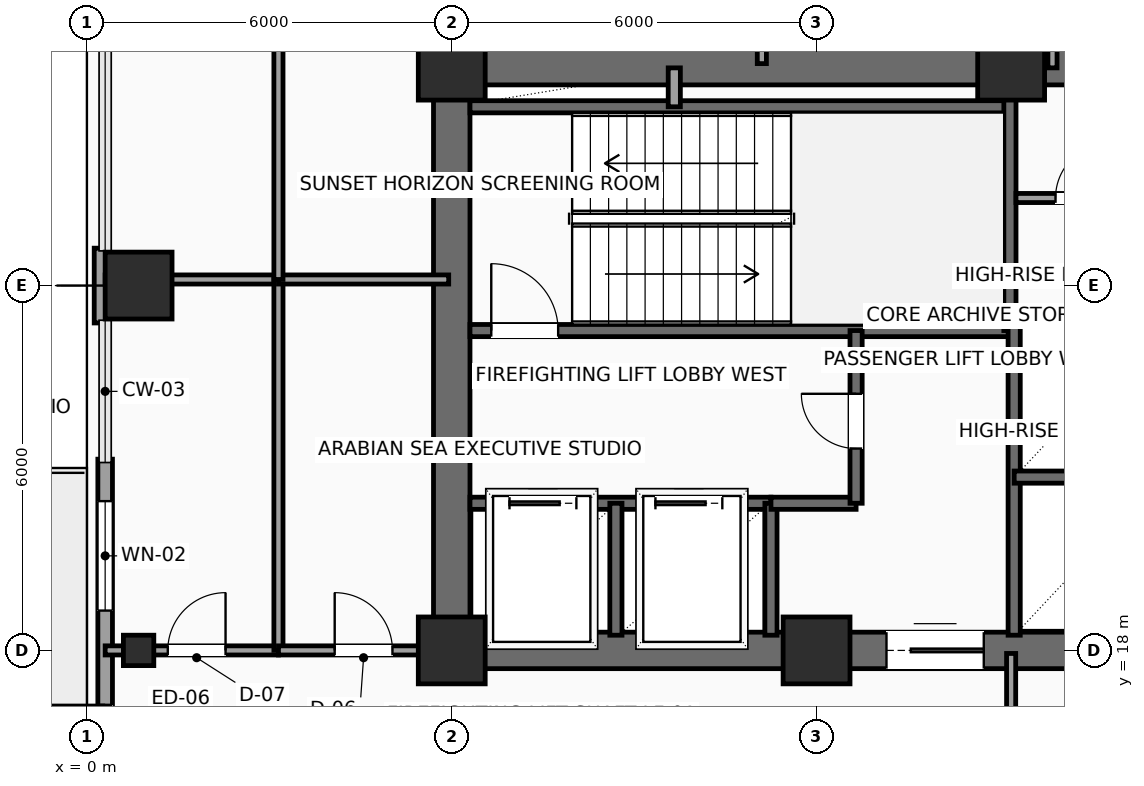
"""IFC4 building model, lengths in metres.
Left out: names, types, materials, properties, quantities, classifications, styles, units other than length and angle.
Written with IfcOpenShell. Run it as: python <this file> out.ifc"""

import sys

from ifc_helpers import new_model, si_unit, direction, frame, frame_2d, origin, origin_2d, place, context, subcontext, project, spatial, rectangle, hollow_rectangle, extrude, element, fill, save


model = new_model("IFC4")
c1 = context("Model", 3, precision=1e-05, world=origin(), true_north=direction((0.0, 1.0)))
c2 = subcontext(c1, "Body", "Model", "MODEL_VIEW")
j1 = project(units=[si_unit("LENGTHUNIT", "METRE"), si_unit("PLANEANGLEUNIT", "RADIAN")], contexts=[c1])
p1 = place(None, origin())
s1 = spatial("IfcSite", under=j1, at=p1, CompositionType="ELEMENT")
p2 = place(p1, origin())
s2 = spatial("IfcBuilding", under=s1, at=p2, CompositionType="ELEMENT")
p3 = place(p2, frame((0.0, 0.0, 160.65)))
s3 = spatial("IfcBuildingStorey", under=s2, at=p3, CompositionType="ELEMENT", Elevation=160.65)
for number, where, z_axis, x_axis in (
    (1, (6.0, 18.0, 0.0), (0.0, 0.0, 1.0), (1.0, 0.0, 0.0)),
    (2, (12.0, 18.0, 0.0), (0.0, 0.0, 1.0), (1.0, 0.0, 0.0)),
    (3, (6.0, 27.6, 0.0), (0.0, 0.0, 1.0), (1.0, 0.0, 0.0)),
    (4, (15.2, 27.6, 0.0), (0.0, 0.0, 1.0), (1.0, 0.0, 0.0)),
):
    element("IfcColumn", number, at=place(p3, frame(where, z_axis=z_axis, x_axis=x_axis)), inside=s3, PredefinedType="COLUMN", context=c2, shape_type="SweptSolid", body=[
        extrude(rectangle(XDim=1.1, YDim=1.1, at=origin_2d()), origin(), (0.0, 0.0, 1.0), 3.75),
    ])
p4 = place(p3, frame((0.85, 18.0, 0.0), z_axis=(0.0, 0.0, 1.0), x_axis=(1.0, 0.0, 0.0)))
e5 = element("IfcColumn", 5, at=p4, inside=s3, PredefinedType="COLUMN", context=c2, shape_type="SweptSolid", body=[
    extrude(hollow_rectangle(XDim=0.5, YDim=0.5, WallThickness=0.025, InnerFilletRadius=0.025, OuterFilletRadius=0.04, at=origin_2d()), origin(), (0.0, 0.0, 1.0), 3.75),
])
p5 = place(p3, frame((0.85, 24.0, 0.0), z_axis=(0.0, 0.0, 1.0), x_axis=(1.0, 0.0, 0.0)))
e6 = element("IfcColumn", 6, at=p5, inside=s3, PredefinedType="COLUMN", context=c2, shape_type="SweptSolid", body=[
    extrude(rectangle(XDim=1.1, YDim=1.1, at=origin_2d()), origin(), (0.0, 0.0, 1.0), 3.75),
])
p6 = place(p3, frame((0.3, 11.855, 0.0), z_axis=(0.0, 0.0, 1.0), x_axis=(0.0, 1.0, 0.0)))
e7 = element("IfcWall", 7, at=p6, inside=s3, PredefinedType="SOLIDWALL", context=c2, shape_type="SweptSolid", body=[
    extrude(rectangle(XDim=9.29, YDim=0.24, at=frame_2d((4.645, 0.0))), origin(), (0.0, 0.0, 1.0), 3.425),
])
p7 = place(p6, frame((4.2, 0.0, 0.0)))
e8 = element("IfcOpeningElement", 8, at=p7, cuts=e7, PredefinedType="OPENING", context=c2, shape_type="SweptSolid", body=[
    extrude(rectangle(XDim=1.05, YDim=2.2, at=frame_2d((0.525, 1.1))), frame((0.0, 0.13, 0.0), z_axis=(0.0, -1.0, 0.0), x_axis=(1.0, 0.0, 0.0)), (0.0, 0.0, 1.0), 0.26),
])
p8 = place(p6, frame((6.8, 0.0, 0.85)))
e9 = element("IfcOpeningElement", 9, at=p8, cuts=e7, PredefinedType="OPENING", context=c2, shape_type="SweptSolid", body=[
    extrude(rectangle(XDim=1.8, YDim=2.1, at=frame_2d((0.9, 1.05))), frame((0.0, 0.13, 0.0), z_axis=(0.0, -1.0, 0.0), x_axis=(1.0, 0.0, 0.0)), (0.0, 0.0, 1.0), 0.26),
])
p9 = place(p3, frame((0.24, 23.385, 0.0), z_axis=(0.0, 0.0, 1.0), x_axis=(0.0, 1.0, 0.0)))
e10 = element("IfcWall", 10, at=p9, inside=s3, PredefinedType="SOLIDWALL", context=c2, shape_type="SweptSolid", body=[
    extrude(rectangle(XDim=1.23, YDim=0.24, at=frame_2d((0.615, 0.0))), origin(), (0.0, 0.0, 1.0), 3.425),
])
p10 = place(p3, frame((6.0, 18.0, 0.0), z_axis=(0.0, 0.0, 1.0), x_axis=(1.0, 0.0, 0.0)))
e11 = element("IfcWall", 11, at=p10, inside=s3, PredefinedType="SHEAR", context=c2, shape_type="SweptSolid", body=[
    extrude(rectangle(XDim=12.0, YDim=0.6, at=frame_2d((6.0, 0.0))), origin(), (0.0, 0.0, 1.0), 3.425),
])
p11 = place(p10, frame((7.15, 0.0, 0.0)))
e12 = element("IfcOpeningElement", 12, at=p11, cuts=e11, PredefinedType="OPENING", context=c2, shape_type="SweptSolid", body=[
    extrude(rectangle(XDim=1.6, YDim=2.3, at=frame_2d((0.8, 1.15))), frame((0.0, 0.31, 0.0), z_axis=(0.0, -1.0, 0.0), x_axis=(1.0, 0.0, 0.0)), (0.0, 0.0, 1.0), 0.62),
])
p12 = place(p3, frame((6.0, 27.6, 0.0), z_axis=(0.0, 0.0, 1.0), x_axis=(1.0, 0.0, 0.0)))
e13 = element("IfcWall", 13, at=p12, inside=s3, PredefinedType="SHEAR", context=c2, shape_type="SweptSolid", body=[
    extrude(rectangle(XDim=12.0, YDim=0.6, at=frame_2d((6.0, 0.0))), origin(), (0.0, 0.0, 1.0), 3.425),
])
p13 = place(p12, frame((10.2, 0.0, 0.0)))
e14 = element("IfcOpeningElement", 14, at=p13, cuts=e13, PredefinedType="OPENING", context=c2, shape_type="SweptSolid", body=[
    extrude(rectangle(XDim=0.9, YDim=2.15, at=frame_2d((0.45, 1.075))), frame((0.0, 0.31, 0.0), z_axis=(0.0, -1.0, 0.0), x_axis=(1.0, 0.0, 0.0)), (0.0, 0.0, 1.0), 0.62),
])
p14 = place(p3, frame((6.0, 18.0, 0.0), z_axis=(0.0, 0.0, 1.0), x_axis=(0.0, 1.0, 0.0)))
e15 = element("IfcWall", 15, at=p14, inside=s3, PredefinedType="SHEAR", context=c2, shape_type="SweptSolid", body=[
    extrude(rectangle(XDim=9.6, YDim=0.6, at=frame_2d((4.8, 0.0))), origin(), (0.0, 0.0, 1.0), 3.425),
])
p15 = place(p3, frame((6.3, 23.26, 0.0), z_axis=(0.0, 0.0, 1.0), x_axis=(1.0, 0.0, 0.0)))
e16 = element("IfcWall", 16, at=p15, inside=s3, PredefinedType="SHEAR", context=c2, shape_type="SweptSolid", body=[
    extrude(rectangle(XDim=8.88, YDim=0.2, at=frame_2d((4.44, 0.0))), origin(), (0.0, 0.0, 1.0), 3.425),
])
p16 = place(p15, frame((0.35, 0.0, 0.0)))
e17 = element("IfcOpeningElement", 17, at=p16, cuts=e16, PredefinedType="OPENING", context=c2, shape_type="SweptSolid", body=[
    extrude(rectangle(XDim=1.1, YDim=2.2, at=frame_2d((0.55, 1.1))), frame((0.0, 0.11, 0.0), z_axis=(0.0, -1.0, 0.0), x_axis=(1.0, 0.0, 0.0)), (0.0, 0.0, 1.0), 0.22),
])
p17 = place(p3, frame((6.3, 26.94, 0.0), z_axis=(0.0, 0.0, 1.0), x_axis=(1.0, 0.0, 0.0)))
e18 = element("IfcWall", 18, at=p17, inside=s3, PredefinedType="SHEAR", context=c2, shape_type="SweptSolid", body=[
    extrude(rectangle(XDim=8.88, YDim=0.2, at=frame_2d((4.44, 0.0))), origin(), (0.0, 0.0, 1.0), 3.425),
])
p18 = place(p3, frame((15.18, 23.26, 0.0), z_axis=(0.0, 0.0, 1.0), x_axis=(0.0, 1.0, 0.0)))
e19 = element("IfcWall", 19, at=p18, inside=s3, PredefinedType="SHEAR", context=c2, shape_type="SweptSolid", body=[
    extrude(rectangle(XDim=4.04, YDim=0.2, at=frame_2d((2.02, 0.0))), origin(), (0.0, 0.0, 1.0), 3.425),
])
p19 = place(p3, frame((6.3, 20.42, 0.0), z_axis=(0.0, 0.0, 1.0), x_axis=(1.0, 0.0, 0.0)))
e20 = element("IfcWall", 20, at=p19, inside=s3, PredefinedType="SHEAR", context=c2, shape_type="SweptSolid", body=[
    extrude(rectangle(XDim=4.95, YDim=0.2, at=frame_2d((2.475, 0.0))), origin(), (0.0, 0.0, 1.0), 3.425),
])
p20 = place(p19, frame((0.65, 0.0, 0.0)))
e21 = element("IfcOpeningElement", 21, at=p20, cuts=e20, PredefinedType="OPENING", context=c2, shape_type="SweptSolid", body=[
    extrude(rectangle(XDim=1.1, YDim=2.2, at=frame_2d((0.55, 1.1))), frame((0.0, 0.11, 0.0), z_axis=(0.0, -1.0, 0.0), x_axis=(1.0, 0.0, 0.0)), (0.0, 0.0, 1.0), 0.22),
])
p21 = place(p19, frame((3.05, 0.0, 0.0)))
e22 = element("IfcOpeningElement", 22, at=p21, cuts=e20, PredefinedType="OPENING", context=c2, shape_type="SweptSolid", body=[
    extrude(rectangle(XDim=1.1, YDim=2.2, at=frame_2d((0.55, 1.1))), frame((0.0, 0.11, 0.0), z_axis=(0.0, -1.0, 0.0), x_axis=(1.0, 0.0, 0.0)), (0.0, 0.0, 1.0), 0.22),
])
for number, where, z_axis, x_axis in (
    (23, (8.7, 18.25, 0.0), (0.0, 0.0, 1.0), (0.0, 1.0, 0.0)),
    (24, (11.25, 18.25, 0.0), (0.0, 0.0, 1.0), (0.0, 1.0, 0.0)),
):
    element("IfcWall", number, at=place(p3, frame(where, z_axis=z_axis, x_axis=x_axis)), inside=s3, PredefinedType="SHEAR", context=c2, shape_type="SweptSolid", body=[
        extrude(rectangle(XDim=2.17, YDim=0.2, at=frame_2d((1.085, 0.0))), origin(), (0.0, 0.0, 1.0), 3.425),
    ])
p22 = place(p3, frame((11.25, 20.42, 0.0), z_axis=(0.0, 0.0, 1.0), x_axis=(1.0, 0.0, 0.0)))
e25 = element("IfcWall", 25, at=p22, inside=s3, PredefinedType="SHEAR", context=c2, shape_type="SweptSolid", body=[
    extrude(rectangle(XDim=1.4, YDim=0.2, at=frame_2d((0.7, 0.0))), origin(), (0.0, 0.0, 1.0), 3.425),
])
p23 = place(p3, frame((12.65, 20.42, 0.0), z_axis=(0.0, 0.0, 1.0), x_axis=(0.0, 1.0, 0.0)))
e26 = element("IfcWall", 26, at=p23, inside=s3, PredefinedType="SHEAR", context=c2, shape_type="SweptSolid", body=[
    extrude(rectangle(XDim=2.84, YDim=0.2, at=frame_2d((1.42, 0.0))), origin(), (0.0, 0.0, 1.0), 3.425),
])
p24 = place(p23, frame((0.9, 0.0, 0.0)))
e27 = element("IfcOpeningElement", 27, at=p24, cuts=e26, PredefinedType="OPENING", context=c2, shape_type="SweptSolid", body=[
    extrude(rectangle(XDim=0.9, YDim=2.15, at=frame_2d((0.45, 1.075))), frame((0.0, 0.11, 0.0), z_axis=(0.0, -1.0, 0.0), x_axis=(1.0, 0.0, 0.0)), (0.0, 0.0, 1.0), 0.22),
])
p25 = place(p3, frame((9.66, 26.94, 0.0), z_axis=(0.0, 0.0, 1.0), x_axis=(0.0, 1.0, 0.0)))
e28 = element("IfcWall", 28, at=p25, inside=s3, PredefinedType="SOLIDWALL", context=c2, shape_type="SweptSolid", body=[
    extrude(rectangle(XDim=0.64, YDim=0.2, at=frame_2d((0.32, 0.0))), origin(), (0.0, 0.0, 1.0), 3.425),
])
p26 = place(p3, frame((15.25, 18.25, 0.0), z_axis=(0.0, 0.0, 1.0), x_axis=(0.0, 1.0, 0.0)))
e29 = element("IfcWall", 29, at=p26, inside=s3, PredefinedType="SHEAR", context=c2, shape_type="SweptSolid", body=[
    extrude(rectangle(XDim=5.2, YDim=0.2, at=frame_2d((2.6, 0.0))), origin(), (0.0, 0.0, 1.0), 3.425),
])
p27 = place(p3, frame((15.25, 20.85, 0.0), z_axis=(0.0, 0.0, 1.0), x_axis=(1.0, 0.0, 0.0)))
e30 = element("IfcWall", 30, at=p27, inside=s3, PredefinedType="SHEAR", context=c2, shape_type="SweptSolid", body=[
    extrude(rectangle(XDim=2.4, YDim=0.2, at=frame_2d((1.2, 0.0))), origin(), (0.0, 0.0, 1.0), 3.425),
])
p28 = place(p3, frame((15.25, 23.45, 0.0), z_axis=(0.0, 0.0, 1.0), x_axis=(1.0, 0.0, 0.0)))
e31 = element("IfcWall", 31, at=p28, inside=s3, PredefinedType="SHEAR", context=c2, shape_type="SweptSolid", body=[
    extrude(rectangle(XDim=2.45, YDim=0.2, at=frame_2d((1.225, 0.0))), origin(), (0.0, 0.0, 1.0), 3.425),
])
p29 = place(p3, frame((15.28, 25.44, 0.0), z_axis=(0.0, 0.0, 1.0), x_axis=(1.0, 0.0, 0.0)))
e32 = element("IfcWall", 32, at=p29, inside=s3, PredefinedType="PARTITIONING", context=c2, shape_type="SweptSolid", body=[
    extrude(rectangle(XDim=2.42, YDim=0.15, at=frame_2d((1.21, 0.0))), origin(), (0.0, 0.0, 1.0), 3.425),
])
p30 = place(p29, frame((0.65, 0.0, 0.0)))
e33 = element("IfcOpeningElement", 33, at=p30, cuts=e32, PredefinedType="OPENING", context=c2, shape_type="SweptSolid", body=[
    extrude(rectangle(XDim=0.9, YDim=2.15, at=frame_2d((0.45, 1.075))), frame((0.0, 0.085, 0.0), z_axis=(0.0, -1.0, 0.0), x_axis=(1.0, 0.0, 0.0)), (0.0, 0.0, 1.0), 0.17),
])
p31 = place(p3, frame((15.2, 17.95, 0.0), z_axis=(0.0, 0.0, 1.0), x_axis=(0.0, -1.0, 0.0)))
e34 = element("IfcWall", 34, at=p31, inside=s3, PredefinedType="PARTITIONING", context=c2, shape_type="SweptSolid", body=[
    extrude(rectangle(XDim=2.4, YDim=0.15, at=frame_2d((1.2, 0.0))), origin(), (0.0, 0.0, 1.0), 3.425),
])
p32 = place(p3, frame((15.88, 27.58, 0.0), z_axis=(0.0, 0.0, 1.0), x_axis=(0.0, 1.0, 0.0)))
e35 = element("IfcWall", 35, at=p32, inside=s3, PredefinedType="PARTITIONING", context=c2, shape_type="SweptSolid", body=[
    extrude(rectangle(XDim=2.67, YDim=0.15, at=frame_2d((1.335, 0.0))), origin(), (0.0, 0.0, 1.0), 3.425),
])
p33 = place(p3, frame((0.3, 18.0, 0.0), z_axis=(0.0, 0.0, 1.0), x_axis=(1.0, 0.0, 0.0)))
e36 = element("IfcWall", 36, at=p33, inside=s3, PredefinedType="PARTITIONING", context=c2, shape_type="SweptSolid", body=[
    extrude(rectangle(XDim=2.85, YDim=0.15, at=frame_2d((1.425, 0.0))), origin(), (0.0, 0.0, 1.0), 2.917),
])
p34 = place(p33, frame((1.03, 0.0, 0.0)))
e37 = element("IfcOpeningElement", 37, at=p34, cuts=e36, PredefinedType="OPENING", context=c2, shape_type="SweptSolid", body=[
    extrude(rectangle(XDim=0.95, YDim=2.15, at=frame_2d((0.475, 1.075))), frame((0.0, 0.085, 0.0), z_axis=(0.0, -1.0, 0.0), x_axis=(1.0, 0.0, 0.0)), (0.0, 0.0, 1.0), 0.17),
])
p35 = place(p3, frame((0.3, 24.1, 0.0), z_axis=(0.0, 0.0, 1.0), x_axis=(1.0, 0.0, 0.0)))
e38 = element("IfcWall", 38, at=p35, inside=s3, PredefinedType="PARTITIONING", context=c2, shape_type="SweptSolid", body=[
    extrude(rectangle(XDim=2.85, YDim=0.15, at=frame_2d((1.425, 0.0))), origin(), (0.0, 0.0, 1.0), 3.425),
])
p36 = place(p3, frame((3.15, 18.0, 0.0), z_axis=(0.0, 0.0, 1.0), x_axis=(0.0, 1.0, 0.0)))
e39 = element("IfcWall", 39, at=p36, inside=s3, PredefinedType="PARTITIONING", context=c2, shape_type="SweptSolid", body=[
    extrude(rectangle(XDim=6.1, YDim=0.15, at=frame_2d((3.05, 0.0))), origin(), (0.0, 0.0, 1.0), 3.425),
])
p37 = place(p3, frame((3.15, 18.0, 0.0), z_axis=(0.0, 0.0, 1.0), x_axis=(1.0, 0.0, 0.0)))
e40 = element("IfcWall", 40, at=p37, inside=s3, PredefinedType="PARTITIONING", context=c2, shape_type="SweptSolid", body=[
    extrude(rectangle(XDim=2.8, YDim=0.15, at=frame_2d((1.4, 0.0))), origin(), (0.0, 0.0, 1.0), 2.917),
])
p38 = place(p37, frame((0.925, 0.0, 0.0)))
e41 = element("IfcOpeningElement", 41, at=p38, cuts=e40, PredefinedType="OPENING", context=c2, shape_type="SweptSolid", body=[
    extrude(rectangle(XDim=0.95, YDim=2.15, at=frame_2d((0.475, 1.075))), frame((0.0, 0.085, 0.0), z_axis=(0.0, -1.0, 0.0), x_axis=(1.0, 0.0, 0.0)), (0.0, 0.0, 1.0), 0.17),
])
p39 = place(p3, frame((3.15, 24.1, 0.0), z_axis=(0.0, 0.0, 1.0), x_axis=(1.0, 0.0, 0.0)))
e42 = element("IfcWall", 42, at=p39, inside=s3, PredefinedType="PARTITIONING", context=c2, shape_type="SweptSolid", body=[
    extrude(rectangle(XDim=2.8, YDim=0.15, at=frame_2d((1.4, 0.0))), origin(), (0.0, 0.0, 1.0), 3.425),
])
p40 = place(p3, frame((3.15, 24.1, 0.0), z_axis=(0.0, 0.0, 1.0), x_axis=(0.0, 1.0, 0.0)))
e43 = element("IfcWall", 43, at=p40, inside=s3, PredefinedType="PARTITIONING", context=c2, shape_type="SweptSolid", body=[
    extrude(rectangle(XDim=6.15, YDim=0.15, at=frame_2d((3.075, 0.0))), origin(), (0.0, 0.0, 1.0), 3.425),
])
p41 = place(p3, frame((6.3, 27.65, 0.0), z_axis=(0.0, 0.0, 1.0), x_axis=(0.0, 1.0, 0.0)))
e44 = element("IfcWall", 44, at=p41, inside=s3, PredefinedType="PARTITIONING", context=c2, shape_type="SweptSolid", body=[
    extrude(rectangle(XDim=2.6, YDim=0.15, at=frame_2d((1.3, 0.0))), origin(), (0.0, 0.0, 1.0), 2.917),
])
p42 = place(p3, frame((11.1, 27.65, 0.0), z_axis=(0.0, 0.0, 1.0), x_axis=(0.0, 1.0, 0.0)))
e45 = element("IfcWall", 45, at=p42, inside=s3, PredefinedType="PARTITIONING", context=c2, shape_type="SweptSolid", body=[
    extrude(rectangle(XDim=2.6, YDim=0.15, at=frame_2d((1.3, 0.0))), origin(), (0.0, 0.0, 1.0), 3.425),
])
p43 = place(p7, origin())
e46 = element("IfcDoor", 46, at=p43, inside=s3, OperationType="SINGLE_SWING_RIGHT", PredefinedType="DOOR", context=c2, shape_type="SweptSolid", body=[
    extrude(rectangle(XDim=1.05, YDim=2.2, at=frame_2d((0.525, 1.1))), frame((0.0, 0.025, 0.0), z_axis=(0.0, -1.0, 0.0), x_axis=(1.0, 0.0, 0.0)), (0.0, 0.0, 1.0), 0.05),
])
fill(e8, e46)
p44 = place(p8, origin())
e47 = element("IfcWindow", 47, at=p44, inside=s3, PartitioningType="SINGLE_PANEL", PredefinedType="WINDOW", context=c2, shape_type="SweptSolid", body=[
    extrude(rectangle(XDim=1.8, YDim=2.1, at=frame_2d((0.9, 1.05))), frame((0.0, 0.03, 0.0), z_axis=(0.0, -1.0, 0.0), x_axis=(1.0, 0.0, 0.0)), (0.0, 0.0, 1.0), 0.06),
])
fill(e9, e47)
p45 = place(p11, origin())
e48 = element("IfcDoor", 48, at=p45, inside=s3, OperationType="DOUBLE_DOOR_SLIDING", PredefinedType="DOOR", context=c2, shape_type="SweptSolid", body=[
    extrude(rectangle(XDim=1.6, YDim=2.3, at=frame_2d((0.8, 1.15))), frame((0.0, 0.025, 0.0), z_axis=(0.0, -1.0, 0.0), x_axis=(1.0, 0.0, 0.0)), (0.0, 0.0, 1.0), 0.05),
])
fill(e12, e48)
p46 = place(p16, origin())
e49 = element("IfcDoor", 49, at=p46, inside=s3, OperationType="SINGLE_SWING_LEFT", PredefinedType="DOOR", context=c2, shape_type="SweptSolid", body=[
    extrude(rectangle(XDim=1.1, YDim=2.2, at=frame_2d((0.55, 1.1))), frame((0.0, 0.025, 0.0), z_axis=(0.0, -1.0, 0.0), x_axis=(1.0, 0.0, 0.0)), (0.0, 0.0, 1.0), 0.05),
])
fill(e17, e49)
p47 = place(p20, origin())
e50 = element("IfcDoor", 50, at=p47, inside=s3, OperationType="SLIDING_TO_LEFT", PredefinedType="DOOR", context=c2, shape_type="SweptSolid", body=[
    extrude(rectangle(XDim=1.1, YDim=2.2, at=frame_2d((0.55, 1.1))), frame((0.0, 0.025, 0.0), z_axis=(0.0, -1.0, 0.0), x_axis=(1.0, 0.0, 0.0)), (0.0, 0.0, 1.0), 0.05),
])
fill(e21, e50)
p48 = place(p21, origin())
e51 = element("IfcDoor", 51, at=p48, inside=s3, OperationType="SLIDING_TO_LEFT", PredefinedType="DOOR", context=c2, shape_type="SweptSolid", body=[
    extrude(rectangle(XDim=1.1, YDim=2.2, at=frame_2d((0.55, 1.1))), frame((0.0, 0.025, 0.0), z_axis=(0.0, -1.0, 0.0), x_axis=(1.0, 0.0, 0.0)), (0.0, 0.0, 1.0), 0.05),
])
fill(e22, e51)
p49 = place(p24, origin())
e52 = element("IfcDoor", 52, at=p49, inside=s3, OperationType="SINGLE_SWING_RIGHT", PredefinedType="DOOR", context=c2, shape_type="SweptSolid", body=[
    extrude(rectangle(XDim=0.9, YDim=2.15, at=frame_2d((0.45, 1.075))), frame((0.0, 0.025, 0.0), z_axis=(0.0, -1.0, 0.0), x_axis=(1.0, 0.0, 0.0)), (0.0, 0.0, 1.0), 0.05),
])
fill(e27, e52)
p50 = place(p30, origin())
e53 = element("IfcDoor", 53, at=p50, inside=s3, OperationType="SINGLE_SWING_RIGHT", PredefinedType="DOOR", context=c2, shape_type="SweptSolid", body=[
    extrude(rectangle(XDim=0.9, YDim=2.15, at=frame_2d((0.45, 1.075))), frame((0.0, 0.025, 0.0), z_axis=(0.0, -1.0, 0.0), x_axis=(1.0, 0.0, 0.0)), (0.0, 0.0, 1.0), 0.05),
])
fill(e33, e53)
p51 = place(p34, origin())
e54 = element("IfcDoor", 54, at=p51, inside=s3, OperationType="SINGLE_SWING_RIGHT", PredefinedType="DOOR", context=c2, shape_type="SweptSolid", body=[
    extrude(rectangle(XDim=0.95, YDim=2.15, at=frame_2d((0.475, 1.075))), frame((0.0, 0.025, 0.0), z_axis=(0.0, -1.0, 0.0), x_axis=(1.0, 0.0, 0.0)), (0.0, 0.0, 1.0), 0.05),
])
fill(e37, e54)
p52 = place(p38, origin())
e55 = element("IfcDoor", 55, at=p52, inside=s3, OperationType="SINGLE_SWING_LEFT", PredefinedType="DOOR", context=c2, shape_type="SweptSolid", body=[
    extrude(rectangle(XDim=0.95, YDim=2.15, at=frame_2d((0.475, 1.075))), frame((0.0, 0.025, 0.0), z_axis=(0.0, -1.0, 0.0), x_axis=(1.0, 0.0, 0.0)), (0.0, 0.0, 1.0), 0.05),
])
fill(e41, e55)
save(model, sys.argv[1])
